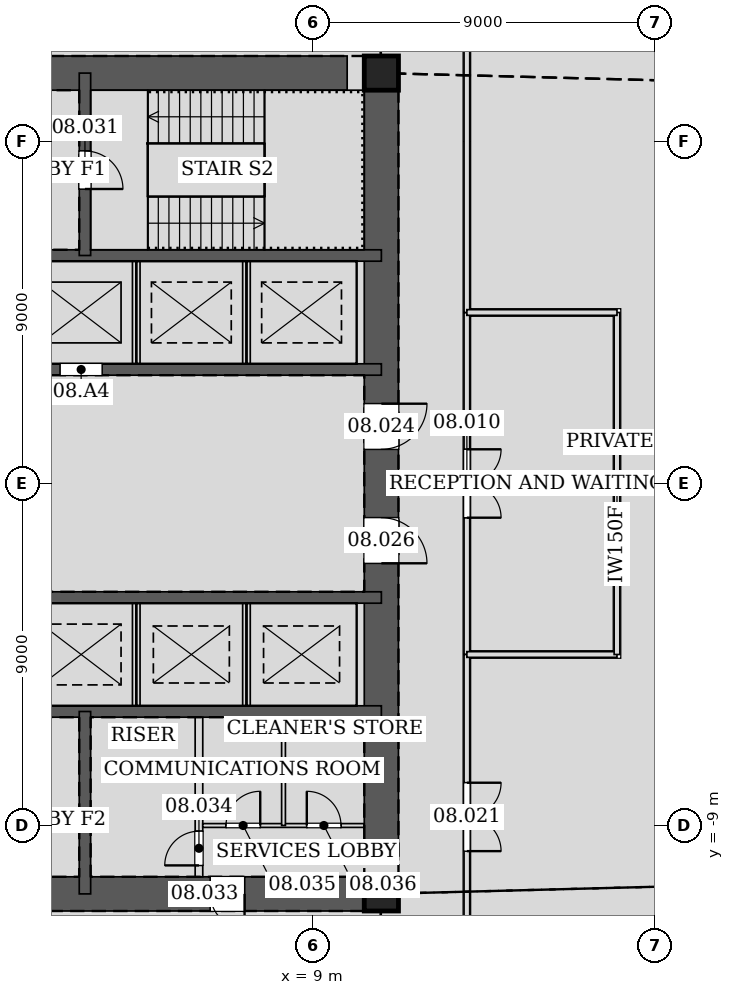
"""IFC4 building model, lengths in metres.
Left out: names, types, materials, properties, quantities, classifications, styles, units other than length and angle.
Written with IfcOpenShell. Run it as: python <this file> out.ifc"""

import sys

from ifc_helpers import new_model, si_unit, direction, frame, frame_2d, origin, origin_2d, place, context, subcontext, project, spatial, rectangle, hollow_rectangle, extrude, element, fill, save


model = new_model("IFC4")
c1 = context("Model", 3, precision=1e-05, world=origin(), true_north=direction((0.0, 1.0)))
c2 = subcontext(c1, "Body", "Model", "MODEL_VIEW")
j1 = project(units=[si_unit("LENGTHUNIT", "METRE"), si_unit("PLANEANGLEUNIT", "RADIAN")], contexts=[c1])
p1 = place(None, origin())
s1 = spatial("IfcSite", under=j1, at=p1, CompositionType="ELEMENT")
p2 = place(p1, origin())
s2 = spatial("IfcBuilding", under=s1, at=p2, CompositionType="ELEMENT")
p3 = place(p2, frame((0.0, 0.0, 41.4)))
s3 = spatial("IfcBuildingStorey", under=s2, at=p3, CompositionType="ELEMENT", Elevation=41.4)
for number, where, z_axis, x_axis in (
    (1, (10.8, 10.8, 0.0), (0.0, 0.0, 1.0), (1.0, 0.0, 0.0)),
    (2, (10.8, -10.8, 0.0), (0.0, 0.0, 1.0), (1.0, 0.0, 0.0)),
):
    element("IfcColumn", number, at=place(p3, frame(where, z_axis=z_axis, x_axis=x_axis)), inside=s3, PredefinedType="COLUMN", context=c2, shape_type="SweptSolid", body=[
        extrude(hollow_rectangle(XDim=0.9, YDim=0.9, WallThickness=0.06, at=origin_2d()), origin(), (0.0, 0.0, 1.0), 4.2),
    ])
p4 = place(p3, frame((-10.8, -10.8, 0.0), z_axis=(0.0, 0.0, 1.0), x_axis=(1.0, 0.0, 0.0)))
e3 = element("IfcWall", 3, at=p4, inside=s3, PredefinedType="SOLIDWALL", context=c2, shape_type="SweptSolid", body=[
    extrude(rectangle(XDim=21.6, YDim=0.9, at=frame_2d((10.8, 0.0))), origin(), (0.0, 0.0, 1.0), 4.2),
])
p5 = place(p4, frame((10.05, 0.0, 0.0)))
e4 = element("IfcOpeningElement", 4, at=p5, cuts=e3, PredefinedType="OPENING", context=c2, shape_type="SweptSolid", body=[
    extrude(rectangle(XDim=1.5, YDim=2.1, at=frame_2d((0.75, 1.05))), frame((0.0, 0.46, 0.0), z_axis=(0.0, -1.0, 0.0), x_axis=(1.0, 0.0, 0.0)), (0.0, 0.0, 1.0), 0.92),
])
p6 = place(p4, frame((17.1, 0.0, 0.0)))
e5 = element("IfcOpeningElement", 5, at=p6, cuts=e3, PredefinedType="OPENING", context=c2, shape_type="SweptSolid", body=[
    extrude(rectangle(XDim=0.9, YDim=2.1, at=frame_2d((0.45, 1.05))), frame((0.0, 0.46, 0.0), z_axis=(0.0, -1.0, 0.0), x_axis=(1.0, 0.0, 0.0)), (0.0, 0.0, 1.0), 0.92),
])
p7 = place(p3, frame((10.8, -10.8, 0.0), z_axis=(0.0, 0.0, 1.0), x_axis=(0.0, 1.0, 0.0)))
e6 = element("IfcWall", 6, at=p7, inside=s3, PredefinedType="SOLIDWALL", context=c2, shape_type="SweptSolid", body=[
    extrude(rectangle(XDim=21.6, YDim=0.9, at=frame_2d((10.8, 0.0))), origin(), (0.0, 0.0, 1.0), 4.2),
])
p8 = place(p7, frame((11.7, 0.0, 0.0)))
e7 = element("IfcOpeningElement", 7, at=p8, cuts=e6, PredefinedType="OPENING", context=c2, shape_type="SweptSolid", body=[
    extrude(rectangle(XDim=1.2, YDim=2.1, at=frame_2d((0.6, 1.05))), frame((0.0, 0.46, 0.0), z_axis=(0.0, -1.0, 0.0), x_axis=(1.0, 0.0, 0.0)), (0.0, 0.0, 1.0), 0.92),
])
p9 = place(p7, frame((8.7, 0.0, 0.0)))
e8 = element("IfcOpeningElement", 8, at=p9, cuts=e6, PredefinedType="OPENING", context=c2, shape_type="SweptSolid", body=[
    extrude(rectangle(XDim=1.2, YDim=2.1, at=frame_2d((0.6, 1.05))), frame((0.0, 0.46, 0.0), z_axis=(0.0, -1.0, 0.0), x_axis=(1.0, 0.0, 0.0)), (0.0, 0.0, 1.0), 0.92),
])
p10 = place(p3, frame((10.8, 10.8, 0.0), z_axis=(0.0, 0.0, 1.0), x_axis=(-1.0, 0.0, 0.0)))
e9 = element("IfcWall", 9, at=p10, inside=s3, PredefinedType="SOLIDWALL", context=c2, shape_type="SweptSolid", body=[
    extrude(rectangle(XDim=21.6, YDim=0.9, at=frame_2d((10.8, 0.0))), origin(), (0.0, 0.0, 1.0), 4.2),
])
p11 = place(p10, frame((10.05, 0.0, 0.0)))
e10 = element("IfcOpeningElement", 10, at=p11, cuts=e9, PredefinedType="OPENING", context=c2, shape_type="SweptSolid", body=[
    extrude(rectangle(XDim=1.5, YDim=2.1, at=frame_2d((0.75, 1.05))), frame((0.0, 0.46, 0.0), z_axis=(0.0, -1.0, 0.0), x_axis=(1.0, 0.0, 0.0)), (0.0, 0.0, 1.0), 0.92),
])
p12 = place(p3, frame((-10.8, 3.0, 0.0), z_axis=(0.0, 0.0, 1.0), x_axis=(1.0, 0.0, 0.0)))
e11 = element("IfcWall", 11, at=p12, inside=s3, PredefinedType="SOLIDWALL", context=c2, shape_type="SweptSolid", body=[
    extrude(rectangle(XDim=21.6, YDim=0.3, at=frame_2d((10.8, 0.0))), origin(), (0.0, 0.0, 1.0), 4.2),
])
p13 = place(p12, frame((1.55, 0.0, 0.0)))
e12 = element("IfcOpeningElement", 12, at=p13, cuts=e11, PredefinedType="OPENING", context=c2, shape_type="SweptSolid", body=[
    extrude(rectangle(XDim=1.1, YDim=2.1, at=frame_2d((0.55, 1.05))), frame((0.0, 0.16, 0.0), z_axis=(0.0, -1.0, 0.0), x_axis=(1.0, 0.0, 0.0)), (0.0, 0.0, 1.0), 0.32),
])
p14 = place(p12, frame((4.45, 0.0, 0.0)))
e13 = element("IfcOpeningElement", 13, at=p14, cuts=e11, PredefinedType="OPENING", context=c2, shape_type="SweptSolid", body=[
    extrude(rectangle(XDim=1.1, YDim=2.1, at=frame_2d((0.55, 1.05))), frame((0.0, 0.16, 0.0), z_axis=(0.0, -1.0, 0.0), x_axis=(1.0, 0.0, 0.0)), (0.0, 0.0, 1.0), 0.32),
])
p15 = place(p12, frame((7.35, 0.0, 0.0)))
e14 = element("IfcOpeningElement", 14, at=p15, cuts=e11, PredefinedType="OPENING", context=c2, shape_type="SweptSolid", body=[
    extrude(rectangle(XDim=1.1, YDim=2.1, at=frame_2d((0.55, 1.05))), frame((0.0, 0.16, 0.0), z_axis=(0.0, -1.0, 0.0), x_axis=(1.0, 0.0, 0.0)), (0.0, 0.0, 1.0), 0.32),
])
p16 = place(p12, frame((13.15, 0.0, 0.0)))
e15 = element("IfcOpeningElement", 15, at=p16, cuts=e11, PredefinedType="OPENING", context=c2, shape_type="SweptSolid", body=[
    extrude(rectangle(XDim=1.1, YDim=2.1, at=frame_2d((0.55, 1.05))), frame((0.0, 0.16, 0.0), z_axis=(0.0, -1.0, 0.0), x_axis=(1.0, 0.0, 0.0)), (0.0, 0.0, 1.0), 0.32),
])
p17 = place(p3, frame((-10.8, 6.0, 0.0), z_axis=(0.0, 0.0, 1.0), x_axis=(1.0, 0.0, 0.0)))
e16 = element("IfcWall", 16, at=p17, inside=s3, PredefinedType="SOLIDWALL", context=c2, shape_type="SweptSolid", body=[
    extrude(rectangle(XDim=21.6, YDim=0.3, at=frame_2d((10.8, 0.0))), origin(), (0.0, 0.0, 1.0), 4.2),
])
p18 = place(p17, frame((10.25, 0.0, 0.0)))
e17 = element("IfcOpeningElement", 17, at=p18, cuts=e16, PredefinedType="OPENING", context=c2, shape_type="SweptSolid", body=[
    extrude(rectangle(XDim=1.1, YDim=2.1, at=frame_2d((0.55, 1.05))), frame((0.0, 0.16, 0.0), z_axis=(0.0, -1.0, 0.0), x_axis=(1.0, 0.0, 0.0)), (0.0, 0.0, 1.0), 0.32),
])
p19 = place(p3, frame((3.0, 6.0, 0.0), z_axis=(0.0, 0.0, 1.0), x_axis=(0.0, 1.0, 0.0)))
e18 = element("IfcWall", 18, at=p19, inside=s3, PredefinedType="SOLIDWALL", context=c2, shape_type="SweptSolid", body=[
    extrude(rectangle(XDim=4.8, YDim=0.3, at=frame_2d((2.4, 0.0))), origin(), (0.0, 0.0, 1.0), 4.2),
])
p20 = place(p19, frame((1.75, 0.0, 0.0)))
e19 = element("IfcOpeningElement", 19, at=p20, cuts=e18, PredefinedType="OPENING", context=c2, shape_type="SweptSolid", body=[
    extrude(rectangle(XDim=1.0, YDim=2.1, at=frame_2d((0.5, 1.05))), frame((0.0, 0.16, 0.0), z_axis=(0.0, -1.0, 0.0), x_axis=(1.0, 0.0, 0.0)), (0.0, 0.0, 1.0), 0.32),
])
p21 = place(p3, frame((-10.8, -3.0, 0.0), z_axis=(0.0, 0.0, 1.0), x_axis=(1.0, 0.0, 0.0)))
e20 = element("IfcWall", 20, at=p21, inside=s3, PredefinedType="SOLIDWALL", context=c2, shape_type="SweptSolid", body=[
    extrude(rectangle(XDim=21.6, YDim=0.3, at=frame_2d((10.8, 0.0))), origin(), (0.0, 0.0, 1.0), 4.2),
])
p22 = place(p3, frame((-10.8, -6.0, 0.0), z_axis=(0.0, 0.0, 1.0), x_axis=(1.0, 0.0, 0.0)))
e21 = element("IfcWall", 21, at=p22, inside=s3, PredefinedType="SOLIDWALL", context=c2, shape_type="SweptSolid", body=[
    extrude(rectangle(XDim=21.6, YDim=0.3, at=frame_2d((10.8, 0.0))), origin(), (0.0, 0.0, 1.0), 4.2),
])
p23 = place(p22, frame((10.25, 0.0, 0.0)))
e22 = element("IfcOpeningElement", 22, at=p23, cuts=e21, PredefinedType="OPENING", context=c2, shape_type="SweptSolid", body=[
    extrude(rectangle(XDim=1.1, YDim=2.1, at=frame_2d((0.55, 1.05))), frame((0.0, 0.16, 0.0), z_axis=(0.0, -1.0, 0.0), x_axis=(1.0, 0.0, 0.0)), (0.0, 0.0, 1.0), 0.32),
])
p24 = place(p3, frame((3.0, -6.0, 0.0), z_axis=(0.0, 0.0, 1.0), x_axis=(0.0, -1.0, 0.0)))
e23 = element("IfcWall", 23, at=p24, inside=s3, PredefinedType="SOLIDWALL", context=c2, shape_type="SweptSolid", body=[
    extrude(rectangle(XDim=4.8, YDim=0.3, at=frame_2d((2.4, 0.0))), origin(), (0.0, 0.0, 1.0), 4.2),
])
p25 = place(p3, frame((13.05, -4.501, 0.0), z_axis=(0.0, 0.0, 1.0), x_axis=(0.0, 1.0, 0.0)))
e24 = element("IfcWall", 24, at=p25, inside=s3, PredefinedType="PARTITIONING", context=c2, shape_type="SweptSolid", body=[
    extrude(rectangle(XDim=9.002, YDim=0.15, at=frame_2d((4.501, 0.0))), origin(), (0.0, 0.0, 1.0), 2.984),
])
p26 = place(p25, frame((3.601, 0.0, 0.0)))
e25 = element("IfcOpeningElement", 25, at=p26, cuts=e24, PredefinedType="OPENING", context=c2, shape_type="SweptSolid", body=[
    extrude(rectangle(XDim=1.8, YDim=2.4, at=frame_2d((0.9, 1.2))), frame((0.0, 0.085, 0.0), z_axis=(0.0, -1.0, 0.0), x_axis=(1.0, 0.0, 0.0)), (0.0, 0.0, 1.0), 0.17),
])
p27 = place(p3, frame((13.05, -13.05, 0.0), z_axis=(0.0, 0.0, 1.0), x_axis=(0.0, 1.0, 0.0)))
e26 = element("IfcWall", 26, at=p27, inside=s3, PredefinedType="PARTITIONING", context=c2, shape_type="SweptSolid", body=[
    extrude(rectangle(XDim=8.551, YDim=0.15, at=frame_2d((4.275, 0.0))), origin(), (0.0, 0.0, 1.0), 3.014),
])
p28 = place(p27, frame((3.375, 0.0, 0.0)))
e27 = element("IfcOpeningElement", 27, at=p28, cuts=e26, PredefinedType="OPENING", context=c2, shape_type="SweptSolid", body=[
    extrude(rectangle(XDim=1.8, YDim=2.4, at=frame_2d((0.9, 1.2))), frame((0.0, 0.085, 0.0), z_axis=(0.0, -1.0, 0.0), x_axis=(1.0, 0.0, 0.0)), (0.0, 0.0, 1.0), 0.17),
])
p29 = place(p3, frame((13.05, 4.499, 0.0), z_axis=(0.0, 0.0, 1.0), x_axis=(0.0, 1.0, 0.0)))
e28 = element("IfcWall", 28, at=p29, inside=s3, PredefinedType="PARTITIONING", context=c2, shape_type="SweptSolid", body=[
    extrude(rectangle(XDim=8.551, YDim=0.15, at=frame_2d((4.275, 0.0))), origin(), (0.0, 0.0, 1.0), 3.014),
])
p30 = place(p3, frame((13.05, -4.5, 0.0), z_axis=(0.0, 0.0, 1.0), x_axis=(1.0, 0.0, 0.0)))
e29 = element("IfcWall", 29, at=p30, inside=s3, PredefinedType="PARTITIONING", context=c2, shape_type="SweptSolid", body=[
    extrude(rectangle(XDim=3.95, YDim=0.15, at=frame_2d((1.975, 0.0))), origin(), (0.0, 0.0, 1.0), 3.426),
])
p31 = place(p3, frame((17.0, -4.5, 0.0), z_axis=(0.0, 0.0, 1.0), x_axis=(0.0, 1.0, 0.0)))
e30 = element("IfcWall", 30, at=p31, inside=s3, PredefinedType="PARTITIONING", context=c2, shape_type="SweptSolid", body=[
    extrude(rectangle(XDim=9.0, YDim=0.15, at=frame_2d((4.5, 0.0))), origin(), (0.0, 0.0, 1.0), 2.984),
])
p32 = place(p3, frame((17.0, 4.5, 0.0), z_axis=(0.0, 0.0, 1.0), x_axis=(-1.0, 0.0, 0.0)))
e31 = element("IfcWall", 31, at=p32, inside=s3, PredefinedType="PARTITIONING", context=c2, shape_type="SweptSolid", body=[
    extrude(rectangle(XDim=3.95, YDim=0.15, at=frame_2d((1.975, 0.0))), origin(), (0.0, 0.0, 1.0), 3.426),
])
for number, where, z_axis, x_axis in (
    (32, (4.35, 3.15, 0.0), (0.0, 0.0, 1.0), (0.0, 1.0, 0.0)),
    (33, (7.25, 3.15, 0.0), (0.0, 0.0, 1.0), (0.0, 1.0, 0.0)),
    (34, (4.35, -5.85, 0.0), (0.0, 0.0, 1.0), (0.0, 1.0, 0.0)),
    (35, (7.25, -5.85, 0.0), (0.0, 0.0, 1.0), (0.0, 1.0, 0.0)),
):
    element("IfcWall", number, at=place(p3, frame(where, z_axis=z_axis, x_axis=x_axis)), inside=s3, PredefinedType="PARTITIONING", context=c2, shape_type="SweptSolid", body=[
        extrude(rectangle(XDim=2.7, YDim=0.2, at=frame_2d((1.35, 0.0))), origin(), (0.0, 0.0, 1.0), 4.2),
    ])
p33 = place(p3, frame((6.0, -10.35, 0.0), z_axis=(0.0, 0.0, 1.0), x_axis=(0.0, 1.0, 0.0)))
e36 = element("IfcWall", 36, at=p33, inside=s3, PredefinedType="PARTITIONING", context=c2, shape_type="SweptSolid", body=[
    extrude(rectangle(XDim=4.2, YDim=0.2, at=frame_2d((2.1, 0.0))), origin(), (0.0, 0.0, 1.0), 4.035),
])
p34 = place(p33, frame((0.3, 0.0, 0.0)))
e37 = element("IfcOpeningElement", 37, at=p34, cuts=e36, PredefinedType="OPENING", context=c2, shape_type="SweptSolid", body=[
    extrude(rectangle(XDim=0.9, YDim=2.1, at=frame_2d((0.45, 1.05))), frame((0.0, 0.11, 0.0), z_axis=(0.0, -1.0, 0.0), x_axis=(1.0, 0.0, 0.0)), (0.0, 0.0, 1.0), 0.22),
])
p35 = place(p3, frame((6.1, -9.0, 0.0), z_axis=(0.0, 0.0, 1.0), x_axis=(1.0, 0.0, 0.0)))
e38 = element("IfcWall", 38, at=p35, inside=s3, PredefinedType="PARTITIONING", context=c2, shape_type="SweptSolid", body=[
    extrude(rectangle(XDim=4.25, YDim=0.1, at=frame_2d((2.125, 0.0))), origin(), (0.0, 0.0, 1.0), 4.035),
])
p36 = place(p35, frame((0.613, 0.0, 0.0)))
e39 = element("IfcOpeningElement", 39, at=p36, cuts=e38, PredefinedType="OPENING", context=c2, shape_type="SweptSolid", body=[
    extrude(rectangle(XDim=0.9, YDim=2.1, at=frame_2d((0.45, 1.05))), frame((0.0, 0.06, 0.0), z_axis=(0.0, -1.0, 0.0), x_axis=(1.0, 0.0, 0.0)), (0.0, 0.0, 1.0), 0.12),
])
p37 = place(p35, frame((2.738, 0.0, 0.0)))
e40 = element("IfcOpeningElement", 40, at=p37, cuts=e38, PredefinedType="OPENING", context=c2, shape_type="SweptSolid", body=[
    extrude(rectangle(XDim=0.9, YDim=2.1, at=frame_2d((0.45, 1.05))), frame((0.0, 0.06, 0.0), z_axis=(0.0, -1.0, 0.0), x_axis=(1.0, 0.0, 0.0)), (0.0, 0.0, 1.0), 0.12),
])
p38 = place(p3, frame((8.225, -9.0, 0.0), z_axis=(0.0, 0.0, 1.0), x_axis=(0.0, 1.0, 0.0)))
e41 = element("IfcWall", 41, at=p38, inside=s3, PredefinedType="PARTITIONING", context=c2, shape_type="SweptSolid", body=[
    extrude(rectangle(XDim=2.85, YDim=0.1, at=frame_2d((1.425, 0.0))), origin(), (0.0, 0.0, 1.0), 4.035),
])
p39 = place(p26, frame((1.8, 0.0, 0.0), z_axis=(0.0, 0.0, 1.0), x_axis=(-1.0, 0.0, 0.0)))
e42 = element("IfcDoor", 42, at=p39, inside=s3, OperationType="DOUBLE_DOOR_SINGLE_SWING", PredefinedType="DOOR", context=c2, shape_type="SweptSolid", body=[
    extrude(rectangle(XDim=1.8, YDim=2.4, at=frame_2d((0.9, 1.2))), frame((0.0, 0.025, 0.0), z_axis=(0.0, -1.0, 0.0), x_axis=(1.0, 0.0, 0.0)), (0.0, 0.0, 1.0), 0.05),
])
fill(e25, e42)
p40 = place(p28, frame((1.8, 0.0, 0.0), z_axis=(0.0, 0.0, 1.0), x_axis=(-1.0, 0.0, 0.0)))
e43 = element("IfcDoor", 43, at=p40, inside=s3, OperationType="DOUBLE_DOOR_SINGLE_SWING", PredefinedType="DOOR", context=c2, shape_type="SweptSolid", body=[
    extrude(rectangle(XDim=1.8, YDim=2.4, at=frame_2d((0.9, 1.2))), frame((0.0, 0.025, 0.0), z_axis=(0.0, -1.0, 0.0), x_axis=(1.0, 0.0, 0.0)), (0.0, 0.0, 1.0), 0.05),
])
fill(e27, e43)
p41 = place(p8, frame((1.2, 0.0, 0.0), z_axis=(0.0, 0.0, 1.0), x_axis=(-1.0, 0.0, 0.0)))
e44 = element("IfcDoor", 44, at=p41, inside=s3, OperationType="SINGLE_SWING_LEFT", PredefinedType="DOOR", context=c2, shape_type="SweptSolid", body=[
    extrude(rectangle(XDim=1.2, YDim=2.1, at=frame_2d((0.6, 1.05))), frame((0.0, 0.025, 0.0), z_axis=(0.0, -1.0, 0.0), x_axis=(1.0, 0.0, 0.0)), (0.0, 0.0, 1.0), 0.05),
])
fill(e7, e44)
p42 = place(p9, frame((1.2, 0.0, 0.0), z_axis=(0.0, 0.0, 1.0), x_axis=(-1.0, 0.0, 0.0)))
e45 = element("IfcDoor", 45, at=p42, inside=s3, OperationType="SINGLE_SWING_RIGHT", PredefinedType="DOOR", context=c2, shape_type="SweptSolid", body=[
    extrude(rectangle(XDim=1.2, YDim=2.1, at=frame_2d((0.6, 1.05))), frame((0.0, 0.025, 0.0), z_axis=(0.0, -1.0, 0.0), x_axis=(1.0, 0.0, 0.0)), (0.0, 0.0, 1.0), 0.05),
])
fill(e8, e45)
p43 = place(p20, frame((1.0, 0.0, 0.0), z_axis=(0.0, 0.0, 1.0), x_axis=(-1.0, 0.0, 0.0)))
e46 = element("IfcDoor", 46, at=p43, inside=s3, OperationType="SINGLE_SWING_RIGHT", PredefinedType="DOOR", context=c2, shape_type="SweptSolid", body=[
    extrude(rectangle(XDim=1.0, YDim=2.1, at=frame_2d((0.5, 1.05))), frame((0.0, 0.025, 0.0), z_axis=(0.0, -1.0, 0.0), x_axis=(1.0, 0.0, 0.0)), (0.0, 0.0, 1.0), 0.05),
])
fill(e19, e46)
p44 = place(p6, frame((0.9, 0.0, 0.0), z_axis=(0.0, 0.0, 1.0), x_axis=(-1.0, 0.0, 0.0)))
e47 = element("IfcDoor", 47, at=p44, inside=s3, OperationType="SINGLE_SWING_LEFT", PredefinedType="DOOR", context=c2, shape_type="SweptSolid", body=[
    extrude(rectangle(XDim=0.9, YDim=2.1, at=frame_2d((0.45, 1.05))), frame((0.0, 0.025, 0.0), z_axis=(0.0, -1.0, 0.0), x_axis=(1.0, 0.0, 0.0)), (0.0, 0.0, 1.0), 0.05),
])
fill(e5, e47)
p45 = place(p34, origin())
e48 = element("IfcDoor", 48, at=p45, inside=s3, OperationType="SINGLE_SWING_LEFT", PredefinedType="DOOR", context=c2, shape_type="SweptSolid", body=[
    extrude(rectangle(XDim=0.9, YDim=2.1, at=frame_2d((0.45, 1.05))), frame((0.0, 0.025, 0.0), z_axis=(0.0, -1.0, 0.0), x_axis=(1.0, 0.0, 0.0)), (0.0, 0.0, 1.0), 0.05),
])
fill(e37, e48)
p46 = place(p36, origin())
e49 = element("IfcDoor", 49, at=p46, inside=s3, OperationType="SINGLE_SWING_RIGHT", PredefinedType="DOOR", context=c2, shape_type="SweptSolid", body=[
    extrude(rectangle(XDim=0.9, YDim=2.1, at=frame_2d((0.45, 1.05))), frame((0.0, 0.025, 0.0), z_axis=(0.0, -1.0, 0.0), x_axis=(1.0, 0.0, 0.0)), (0.0, 0.0, 1.0), 0.05),
])
fill(e39, e49)
p47 = place(p37, origin())
e50 = element("IfcDoor", 50, at=p47, inside=s3, OperationType="SINGLE_SWING_LEFT", PredefinedType="DOOR", context=c2, shape_type="SweptSolid", body=[
    extrude(rectangle(XDim=0.9, YDim=2.1, at=frame_2d((0.45, 1.05))), frame((0.0, 0.025, 0.0), z_axis=(0.0, -1.0, 0.0), x_axis=(1.0, 0.0, 0.0)), (0.0, 0.0, 1.0), 0.05),
])
fill(e40, e50)
p48 = place(p16, origin())
e51 = element("IfcDoor", 51, at=p48, inside=s3, OperationType="DOUBLE_DOOR_SLIDING", PredefinedType="DOOR", context=c2, shape_type="SweptSolid", body=[
    extrude(rectangle(XDim=1.1, YDim=2.1, at=frame_2d((0.55, 1.05))), frame((0.0, 0.025, 0.0), z_axis=(0.0, -1.0, 0.0), x_axis=(1.0, 0.0, 0.0)), (0.0, 0.0, 1.0), 0.05),
])
fill(e15, e51)
save(model, sys.argv[1])
